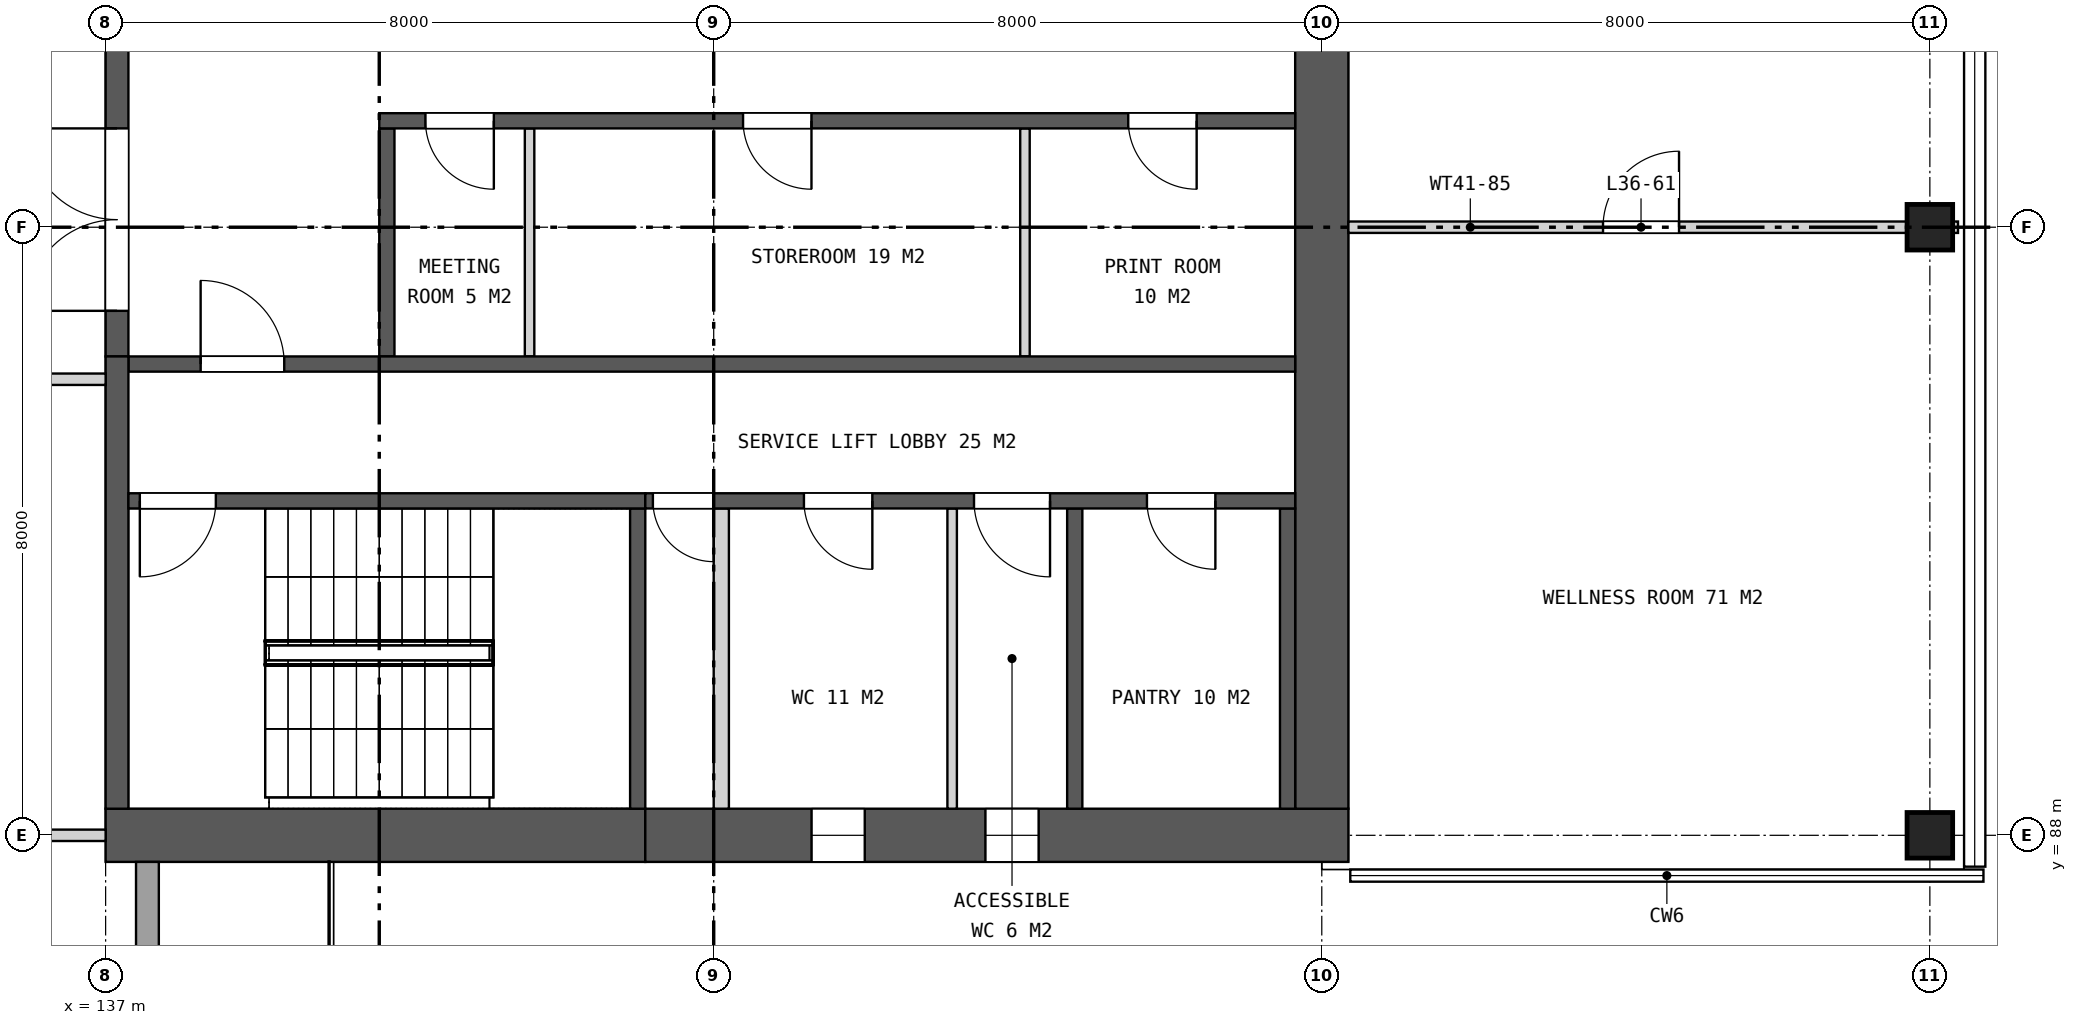
"""IFC4 building model, lengths in metres.
Left out: names, types, materials, properties, quantities, classifications, styles, units other than length and angle.
Written with IfcOpenShell. Run it as: python <this file> out.ifc"""

import sys

from ifc_helpers import new_model, si_unit, direction, frame, frame_2d, origin, origin_2d, place, context, subcontext, project, spatial, rectangle, extrude, element, fill, save


model = new_model("IFC4")
c1 = context("Model", 3, precision=1e-05, world=origin(), true_north=direction((0.0, 1.0)))
c2 = subcontext(c1, "Body", "Model", "MODEL_VIEW")
j1 = project(units=[si_unit("LENGTHUNIT", "METRE"), si_unit("PLANEANGLEUNIT", "RADIAN")], contexts=[c1])
p1 = place(None, origin())
s1 = spatial("IfcSite", under=j1, at=p1, CompositionType="ELEMENT")
p2 = place(p1, origin())
s2 = spatial("IfcBuilding", under=s1, at=p2, CompositionType="ELEMENT")
p3 = place(p2, frame((0.0, 0.0, 171.5)))
s3 = spatial("IfcBuildingStorey", under=s2, at=p3, CompositionType="ELEMENT", Elevation=171.5)
for number, where, z_axis, x_axis in (
    (1, (161.0, 88.0, 0.0), (0.0, 0.0, 1.0), (1.0, 0.0, 0.0)),
    (2, (161.0, 96.0, 0.0), (0.0, 0.0, 1.0), (1.0, 0.0, 0.0)),
):
    element("IfcColumn", number, at=place(p3, frame(where, z_axis=z_axis, x_axis=x_axis)), inside=s3, PredefinedType="COLUMN", context=c2, shape_type="SweptSolid", body=[
        extrude(rectangle(XDim=0.6, YDim=0.6, at=origin_2d()), origin(), (0.0, 0.0, 1.0), 7.4),
    ])
p4 = place(p3, frame((137.0, 88.0, 0.0), z_axis=(0.0, 0.0, 1.0), x_axis=(1.0, 0.0, 0.0)))
e3 = element("IfcWall", 3, at=p4, inside=s3, PredefinedType="SHEAR", context=c2, shape_type="SweptSolid", body=[
    extrude(rectangle(XDim=7.1, YDim=0.7, at=frame_2d((3.55, 0.0))), origin(), (0.0, 0.0, 1.0), 7.4),
])
p5 = place(p3, frame((144.1, 88.0, 0.0), z_axis=(0.0, 0.0, 1.0), x_axis=(1.0, 0.0, 0.0)))
e4 = element("IfcWall", 4, at=p5, inside=s3, PredefinedType="SHEAR", context=c2, shape_type="SweptSolid", body=[
    extrude(rectangle(XDim=9.25, YDim=0.7, at=frame_2d((4.625, 0.0))), origin(), (0.0, 0.0, 1.0), 7.4),
])
p6 = place(p5, frame((2.187, 0.0, 1.5)))
e5 = element("IfcOpeningElement", 5, at=p6, cuts=e4, PredefinedType="OPENING", context=c2, shape_type="SweptSolid", body=[
    extrude(rectangle(XDim=0.7, YDim=0.9, at=frame_2d((0.35, 0.45))), frame((0.0, 0.36, 0.0), z_axis=(0.0, -1.0, 0.0), x_axis=(1.0, 0.0, 0.0)), (0.0, 0.0, 1.0), 0.72),
])
p7 = place(p5, frame((4.475, 0.0, 1.5)))
e6 = element("IfcOpeningElement", 6, at=p7, cuts=e4, PredefinedType="OPENING", context=c2, shape_type="SweptSolid", body=[
    extrude(rectangle(XDim=0.7, YDim=0.9, at=frame_2d((0.35, 0.45))), frame((0.0, 0.36, 0.0), z_axis=(0.0, -1.0, 0.0), x_axis=(1.0, 0.0, 0.0)), (0.0, 0.0, 1.0), 0.72),
])
p8 = place(p3, frame((153.0, 88.35, 0.0), z_axis=(0.0, 0.0, 1.0), x_axis=(0.0, 1.0, 0.0)))
e7 = element("IfcWall", 7, at=p8, inside=s3, PredefinedType="SHEAR", context=c2, shape_type="SweptSolid", body=[
    extrude(rectangle(XDim=23.3, YDim=0.7, at=frame_2d((11.65, 0.0))), origin(), (0.0, 0.0, 1.0), 7.4),
])
p9 = place(p8, frame((10.45, 0.0, 0.0)))
e8 = element("IfcOpeningElement", 8, at=p9, cuts=e7, PredefinedType="OPENING", context=c2, shape_type="SweptSolid", body=[
    extrude(rectangle(XDim=2.4, YDim=2.4, at=frame_2d((1.2, 1.2))), frame((0.0, 0.36, 0.0), z_axis=(0.0, -1.0, 0.0), x_axis=(1.0, 0.0, 0.0)), (0.0, 0.0, 1.0), 0.72),
])
p10 = place(p3, frame((137.15, 94.3, 0.0), z_axis=(0.0, 0.0, 1.0), x_axis=(0.0, 1.0, 0.0)))
e9 = element("IfcWall", 9, at=p10, inside=s3, PredefinedType="SHEAR", context=c2, shape_type="SweptSolid", body=[
    extrude(rectangle(XDim=11.4, YDim=0.3, at=frame_2d((5.7, 0.0))), origin(), (0.0, 0.0, 1.0), 7.4),
])
p11 = place(p10, frame((0.6, 0.0, 0.0)))
e10 = element("IfcOpeningElement", 10, at=p11, cuts=e9, PredefinedType="OPENING", context=c2, shape_type="SweptSolid", body=[
    extrude(rectangle(XDim=2.4, YDim=2.4, at=frame_2d((1.2, 1.2))), frame((0.0, 0.16, 0.0), z_axis=(0.0, -1.0, 0.0), x_axis=(1.0, 0.0, 0.0)), (0.0, 0.0, 1.0), 0.32),
])
p12 = place(p10, frame((4.5, 0.0, 0.0)))
e11 = element("IfcOpeningElement", 11, at=p12, cuts=e9, PredefinedType="OPENING", context=c2, shape_type="SweptSolid", body=[
    extrude(rectangle(XDim=2.4, YDim=2.4, at=frame_2d((1.2, 1.2))), frame((0.0, 0.16, 0.0), z_axis=(0.0, -1.0, 0.0), x_axis=(1.0, 0.0, 0.0)), (0.0, 0.0, 1.0), 0.32),
])
p13 = place(p10, frame((8.4, 0.0, 0.0)))
e12 = element("IfcOpeningElement", 12, at=p13, cuts=e9, PredefinedType="OPENING", context=c2, shape_type="SweptSolid", body=[
    extrude(rectangle(XDim=2.4, YDim=2.4, at=frame_2d((1.2, 1.2))), frame((0.0, 0.16, 0.0), z_axis=(0.0, -1.0, 0.0), x_axis=(1.0, 0.0, 0.0)), (0.0, 0.0, 1.0), 0.32),
])
p14 = place(p3, frame((140.7, 94.3, 0.0), z_axis=(0.0, 0.0, 1.0), x_axis=(0.0, 1.0, 0.0)))
e13 = element("IfcWall", 13, at=p14, inside=s3, PredefinedType="SHEAR", context=c2, shape_type="SweptSolid", body=[
    extrude(rectangle(XDim=3.0, YDim=0.2, at=frame_2d((1.5, 0.0))), origin(), (0.0, 0.0, 1.0), 7.4),
])
for number, where, z_axis, x_axis in (
    (14, (142.577, 94.3, 0.0), (0.0, 0.0, 1.0), (0.0, 1.0, 0.0)),
    (15, (149.095, 94.3, 0.0), (0.0, 0.0, 1.0), (0.0, 1.0, 0.0)),
):
    element("IfcWall", number, at=place(p3, frame(where, z_axis=z_axis, x_axis=x_axis)), inside=s3, PredefinedType="PARTITIONING", context=c2, shape_type="SweptSolid", body=[
        extrude(rectangle(XDim=3.0, YDim=0.125, at=frame_2d((1.5, 0.0))), origin(), (0.0, 0.0, 1.0), 7.4),
    ])
p15 = place(p3, frame((140.6, 97.4, 0.0), z_axis=(0.0, 0.0, 1.0), x_axis=(1.0, 0.0, 0.0)))
e16 = element("IfcWall", 16, at=p15, inside=s3, PredefinedType="SHEAR", context=c2, shape_type="SweptSolid", body=[
    extrude(rectangle(XDim=12.05, YDim=0.2, at=frame_2d((6.025, 0.0))), origin(), (0.0, 0.0, 1.0), 7.4),
])
p16 = place(p15, frame((0.607, 0.0, 0.0)))
e17 = element("IfcOpeningElement", 17, at=p16, cuts=e16, PredefinedType="OPENING", context=c2, shape_type="SweptSolid", body=[
    extrude(rectangle(XDim=0.9, YDim=2.1, at=frame_2d((0.45, 1.05))), frame((0.0, 0.11, 0.0), z_axis=(0.0, -1.0, 0.0), x_axis=(1.0, 0.0, 0.0)), (0.0, 0.0, 1.0), 0.22),
])
p17 = place(p15, frame((4.786, 0.0, 0.0)))
e18 = element("IfcOpeningElement", 18, at=p17, cuts=e16, PredefinedType="OPENING", context=c2, shape_type="SweptSolid", body=[
    extrude(rectangle(XDim=0.9, YDim=2.1, at=frame_2d((0.45, 1.05))), frame((0.0, 0.11, 0.0), z_axis=(0.0, -1.0, 0.0), x_axis=(1.0, 0.0, 0.0)), (0.0, 0.0, 1.0), 0.22),
])
p18 = place(p15, frame((9.854, 0.0, 0.0)))
e19 = element("IfcOpeningElement", 19, at=p18, cuts=e16, PredefinedType="OPENING", context=c2, shape_type="SweptSolid", body=[
    extrude(rectangle(XDim=0.9, YDim=2.1, at=frame_2d((0.45, 1.05))), frame((0.0, 0.11, 0.0), z_axis=(0.0, -1.0, 0.0), x_axis=(1.0, 0.0, 0.0)), (0.0, 0.0, 1.0), 0.22),
])
p19 = place(p3, frame((137.3, 94.2, 0.0), z_axis=(0.0, 0.0, 1.0), x_axis=(1.0, 0.0, 0.0)))
e20 = element("IfcWall", 20, at=p19, inside=s3, PredefinedType="SHEAR", context=c2, shape_type="SweptSolid", body=[
    extrude(rectangle(XDim=15.35, YDim=0.2, at=frame_2d((7.675, 0.0))), origin(), (0.0, 0.0, 1.0), 7.4),
])
p20 = place(p19, frame((0.95, 0.0, 0.0)))
e21 = element("IfcOpeningElement", 21, at=p20, cuts=e20, PredefinedType="OPENING", context=c2, shape_type="SweptSolid", body=[
    extrude(rectangle(XDim=1.1, YDim=2.1, at=frame_2d((0.55, 1.05))), frame((0.0, 0.11, 0.0), z_axis=(0.0, -1.0, 0.0), x_axis=(1.0, 0.0, 0.0)), (0.0, 0.0, 1.0), 0.22),
])
p21 = place(p3, frame((137.15, 88.35, 0.0), z_axis=(0.0, 0.0, 1.0), x_axis=(0.0, 1.0, 0.0)))
e22 = element("IfcWall", 22, at=p21, inside=s3, PredefinedType="SHEAR", context=c2, shape_type="SweptSolid", body=[
    extrude(rectangle(XDim=5.95, YDim=0.3, at=frame_2d((2.975, 0.0))), origin(), (0.0, 0.0, 1.0), 7.4),
])
for number, where, z_axis, x_axis in (
    (23, (144.0, 88.35, 0.0), (0.0, 0.0, 1.0), (0.0, 1.0, 0.0)),
    (24, (149.75, 88.35, 0.0), (0.0, 0.0, 1.0), (0.0, 1.0, 0.0)),
    (25, (152.55, 88.35, 0.0), (0.0, 0.0, 1.0), (0.0, 1.0, 0.0)),
):
    element("IfcWall", number, at=place(p3, frame(where, z_axis=z_axis, x_axis=x_axis)), inside=s3, PredefinedType="SHEAR", context=c2, shape_type="SweptSolid", body=[
        extrude(rectangle(XDim=3.95, YDim=0.2, at=frame_2d((1.975, 0.0))), origin(), (0.0, 0.0, 1.0), 7.4),
    ])
p22 = place(p3, frame((145.1, 88.35, 0.0), z_axis=(0.0, 0.0, 1.0), x_axis=(0.0, 1.0, 0.0)))
e26 = element("IfcWall", 26, at=p22, inside=s3, PredefinedType="PARTITIONING", context=c2, shape_type="SweptSolid", body=[
    extrude(rectangle(XDim=3.95, YDim=0.2, at=frame_2d((1.975, 0.0))), origin(), (0.0, 0.0, 1.0), 7.4),
])
p23 = place(p3, frame((148.137, 88.35, 0.0), z_axis=(0.0, 0.0, 1.0), x_axis=(0.0, 1.0, 0.0)))
e27 = element("IfcWall", 27, at=p23, inside=s3, PredefinedType="PARTITIONING", context=c2, shape_type="SweptSolid", body=[
    extrude(rectangle(XDim=3.95, YDim=0.125, at=frame_2d((1.975, 0.0))), origin(), (0.0, 0.0, 1.0), 7.4),
])
p24 = place(p3, frame((137.3, 92.4, 0.0), z_axis=(0.0, 0.0, 1.0), x_axis=(1.0, 0.0, 0.0)))
e28 = element("IfcWall", 28, at=p24, inside=s3, PredefinedType="SHEAR", context=c2, shape_type="SweptSolid", body=[
    extrude(rectangle(XDim=6.8, YDim=0.2, at=frame_2d((3.4, 0.0))), origin(), (0.0, 0.0, 1.0), 7.4),
])
p25 = place(p24, frame((0.15, 0.0, 0.0)))
e29 = element("IfcOpeningElement", 29, at=p25, cuts=e28, PredefinedType="OPENING", context=c2, shape_type="SweptSolid", body=[
    extrude(rectangle(XDim=1.0, YDim=2.1, at=frame_2d((0.5, 1.05))), frame((0.0, 0.11, 0.0), z_axis=(0.0, -1.0, 0.0), x_axis=(1.0, 0.0, 0.0)), (0.0, 0.0, 1.0), 0.22),
])
p26 = place(p3, frame((144.1, 92.4, 0.0), z_axis=(0.0, 0.0, 1.0), x_axis=(1.0, 0.0, 0.0)))
e30 = element("IfcWall", 30, at=p26, inside=s3, PredefinedType="SHEAR", context=c2, shape_type="SweptSolid", body=[
    extrude(rectangle(XDim=8.55, YDim=0.2, at=frame_2d((4.275, 0.0))), origin(), (0.0, 0.0, 1.0), 7.4),
])
p27 = place(p26, frame((0.1, 0.0, 0.0)))
e31 = element("IfcOpeningElement", 31, at=p27, cuts=e30, PredefinedType="OPENING", context=c2, shape_type="SweptSolid", body=[
    extrude(rectangle(XDim=0.8, YDim=2.1, at=frame_2d((0.4, 1.05))), frame((0.0, 0.11, 0.0), z_axis=(0.0, -1.0, 0.0), x_axis=(1.0, 0.0, 0.0)), (0.0, 0.0, 1.0), 0.22),
])
p28 = place(p26, frame((2.087, 0.0, 0.0)))
e32 = element("IfcOpeningElement", 32, at=p28, cuts=e30, PredefinedType="OPENING", context=c2, shape_type="SweptSolid", body=[
    extrude(rectangle(XDim=0.9, YDim=2.1, at=frame_2d((0.45, 1.05))), frame((0.0, 0.11, 0.0), z_axis=(0.0, -1.0, 0.0), x_axis=(1.0, 0.0, 0.0)), (0.0, 0.0, 1.0), 0.22),
])
p29 = place(p26, frame((4.325, 0.0, 0.0)))
e33 = element("IfcOpeningElement", 33, at=p29, cuts=e30, PredefinedType="OPENING", context=c2, shape_type="SweptSolid", body=[
    extrude(rectangle(XDim=1.0, YDim=2.1, at=frame_2d((0.5, 1.05))), frame((0.0, 0.11, 0.0), z_axis=(0.0, -1.0, 0.0), x_axis=(1.0, 0.0, 0.0)), (0.0, 0.0, 1.0), 0.22),
])
p30 = place(p26, frame((6.6, 0.0, 0.0)))
e34 = element("IfcOpeningElement", 34, at=p30, cuts=e30, PredefinedType="OPENING", context=c2, shape_type="SweptSolid", body=[
    extrude(rectangle(XDim=0.9, YDim=2.1, at=frame_2d((0.45, 1.05))), frame((0.0, 0.11, 0.0), z_axis=(0.0, -1.0, 0.0), x_axis=(1.0, 0.0, 0.0)), (0.0, 0.0, 1.0), 0.22),
])
p31 = place(p3, frame((137.55, 80.038, 0.0), z_axis=(0.0, 0.0, 1.0), x_axis=(0.0, 1.0, 0.0)))
e35 = element("IfcWall", 35, at=p31, inside=s3, PredefinedType="SOLIDWALL", context=c2, shape_type="SweptSolid", body=[
    extrude(rectangle(XDim=7.612, YDim=0.3, at=frame_2d((3.806, 0.0))), origin(), (0.0, 0.0, 1.0), 7.1),
])
p32 = place(p31, frame((2.762, 0.0, 0.0)))
e36 = element("IfcOpeningElement", 36, at=p32, cuts=e35, PredefinedType="OPENING", context=c2, shape_type="SweptSolid", body=[
    extrude(rectangle(XDim=2.4, YDim=2.4, at=frame_2d((1.2, 1.2))), frame((0.0, 0.16, 0.0), z_axis=(0.0, -1.0, 0.0), x_axis=(1.0, 0.0, 0.0)), (0.0, 0.0, 1.0), 0.32),
])
p33 = place(p3, frame((129.075, 88.0, 0.0), z_axis=(0.0, 0.0, 1.0), x_axis=(1.0, 0.0, 0.0)))
e37 = element("IfcWall", 37, at=p33, inside=s3, PredefinedType="PARTITIONING", context=c2, shape_type="SweptSolid", body=[
    extrude(rectangle(XDim=7.925, YDim=0.15, at=frame_2d((3.962, 0.0))), origin(), (0.0, 0.0, 1.0), 6.64),
])
p34 = place(p3, frame((131.475, 94.0, 0.0), z_axis=(0.0, 0.0, 1.0), x_axis=(1.0, 0.0, 0.0)))
e38 = element("IfcWall", 38, at=p34, inside=s3, PredefinedType="PARTITIONING", context=c2, shape_type="SweptSolid", body=[
    extrude(rectangle(XDim=5.525, YDim=0.15, at=frame_2d((2.762, 0.0))), origin(), (0.0, 0.0, 1.0), 6.64),
])
p35 = place(p3, frame((153.35, 96.0, 0.0), z_axis=(0.0, 0.0, 1.0), x_axis=(1.0, 0.0, 0.0)))
e39 = element("IfcWall", 39, at=p35, inside=s3, PredefinedType="PARTITIONING", context=c2, shape_type="SweptSolid", body=[
    extrude(rectangle(XDim=8.02, YDim=0.15, at=frame_2d((4.01, 0.0))), origin(), (0.0, 0.0, 1.0), 6.64),
])
p36 = place(p35, frame((3.35, 0.0, 0.0)))
e40 = element("IfcOpeningElement", 40, at=p36, cuts=e39, PredefinedType="OPENING", context=c2, shape_type="SweptSolid", body=[
    extrude(rectangle(XDim=1.0, YDim=2.1, at=frame_2d((0.5, 1.05))), frame((0.0, 0.085, 0.0), z_axis=(0.0, -1.0, 0.0), x_axis=(1.0, 0.0, 0.0)), (0.0, 0.0, 1.0), 0.17),
])
p37 = place(p6, origin())
e41 = element("IfcWindow", 41, at=p37, inside=s3, PartitioningType="SINGLE_PANEL", PredefinedType="WINDOW", context=c2, shape_type="SweptSolid", body=[
    extrude(rectangle(XDim=0.7, YDim=0.9, at=frame_2d((0.35, 0.45))), frame((0.0, 0.03, 0.0), z_axis=(0.0, -1.0, 0.0), x_axis=(1.0, 0.0, 0.0)), (0.0, 0.0, 1.0), 0.06),
])
fill(e5, e41)
p38 = place(p7, origin())
e42 = element("IfcWindow", 42, at=p38, inside=s3, PartitioningType="SINGLE_PANEL", PredefinedType="WINDOW", context=c2, shape_type="SweptSolid", body=[
    extrude(rectangle(XDim=0.7, YDim=0.9, at=frame_2d((0.35, 0.45))), frame((0.0, 0.03, 0.0), z_axis=(0.0, -1.0, 0.0), x_axis=(1.0, 0.0, 0.0)), (0.0, 0.0, 1.0), 0.06),
])
fill(e6, e42)
p39 = place(p11, origin())
e43 = element("IfcDoor", 43, at=p39, inside=s3, OperationType="DOUBLE_DOOR_SINGLE_SWING", PredefinedType="DOOR", context=c2, shape_type="SweptSolid", body=[
    extrude(rectangle(XDim=2.4, YDim=2.4, at=frame_2d((1.2, 1.2))), frame((0.0, 0.025, 0.0), z_axis=(0.0, -1.0, 0.0), x_axis=(1.0, 0.0, 0.0)), (0.0, 0.0, 1.0), 0.05),
])
fill(e10, e43)
p40 = place(p16, frame((0.9, 0.0, 0.0), z_axis=(0.0, 0.0, 1.0), x_axis=(-1.0, 0.0, 0.0)))
e44 = element("IfcDoor", 44, at=p40, inside=s3, OperationType="SINGLE_SWING_LEFT", PredefinedType="DOOR", context=c2, shape_type="SweptSolid", body=[
    extrude(rectangle(XDim=0.9, YDim=2.1, at=frame_2d((0.45, 1.05))), frame((0.0, 0.025, 0.0), z_axis=(0.0, -1.0, 0.0), x_axis=(1.0, 0.0, 0.0)), (0.0, 0.0, 1.0), 0.05),
])
fill(e17, e44)
p41 = place(p17, frame((0.9, 0.0, 0.0), z_axis=(0.0, 0.0, 1.0), x_axis=(-1.0, 0.0, 0.0)))
e45 = element("IfcDoor", 45, at=p41, inside=s3, OperationType="SINGLE_SWING_LEFT", PredefinedType="DOOR", context=c2, shape_type="SweptSolid", body=[
    extrude(rectangle(XDim=0.9, YDim=2.1, at=frame_2d((0.45, 1.05))), frame((0.0, 0.025, 0.0), z_axis=(0.0, -1.0, 0.0), x_axis=(1.0, 0.0, 0.0)), (0.0, 0.0, 1.0), 0.05),
])
fill(e18, e45)
p42 = place(p18, frame((0.9, 0.0, 0.0), z_axis=(0.0, 0.0, 1.0), x_axis=(-1.0, 0.0, 0.0)))
e46 = element("IfcDoor", 46, at=p42, inside=s3, OperationType="SINGLE_SWING_LEFT", PredefinedType="DOOR", context=c2, shape_type="SweptSolid", body=[
    extrude(rectangle(XDim=0.9, YDim=2.1, at=frame_2d((0.45, 1.05))), frame((0.0, 0.025, 0.0), z_axis=(0.0, -1.0, 0.0), x_axis=(1.0, 0.0, 0.0)), (0.0, 0.0, 1.0), 0.05),
])
fill(e19, e46)
p43 = place(p20, origin())
e47 = element("IfcDoor", 47, at=p43, inside=s3, OperationType="SINGLE_SWING_LEFT", PredefinedType="DOOR", context=c2, shape_type="SweptSolid", body=[
    extrude(rectangle(XDim=1.1, YDim=2.1, at=frame_2d((0.55, 1.05))), frame((0.0, 0.025, 0.0), z_axis=(0.0, -1.0, 0.0), x_axis=(1.0, 0.0, 0.0)), (0.0, 0.0, 1.0), 0.05),
])
fill(e21, e47)
p44 = place(p25, frame((1.0, 0.0, 0.0), z_axis=(0.0, 0.0, 1.0), x_axis=(-1.0, 0.0, 0.0)))
e48 = element("IfcDoor", 48, at=p44, inside=s3, OperationType="SINGLE_SWING_RIGHT", PredefinedType="DOOR", context=c2, shape_type="SweptSolid", body=[
    extrude(rectangle(XDim=1.0, YDim=2.1, at=frame_2d((0.5, 1.05))), frame((0.0, 0.025, 0.0), z_axis=(0.0, -1.0, 0.0), x_axis=(1.0, 0.0, 0.0)), (0.0, 0.0, 1.0), 0.05),
])
fill(e29, e48)
p45 = place(p27, frame((0.8, 0.0, 0.0), z_axis=(0.0, 0.0, 1.0), x_axis=(-1.0, 0.0, 0.0)))
e49 = element("IfcDoor", 49, at=p45, inside=s3, OperationType="SINGLE_SWING_LEFT", PredefinedType="DOOR", context=c2, shape_type="SweptSolid", body=[
    extrude(rectangle(XDim=0.8, YDim=2.1, at=frame_2d((0.4, 1.05))), frame((0.0, 0.025, 0.0), z_axis=(0.0, -1.0, 0.0), x_axis=(1.0, 0.0, 0.0)), (0.0, 0.0, 1.0), 0.05),
])
fill(e31, e49)
p46 = place(p28, frame((0.9, 0.0, 0.0), z_axis=(0.0, 0.0, 1.0), x_axis=(-1.0, 0.0, 0.0)))
e50 = element("IfcDoor", 50, at=p46, inside=s3, OperationType="SINGLE_SWING_LEFT", PredefinedType="DOOR", context=c2, shape_type="SweptSolid", body=[
    extrude(rectangle(XDim=0.9, YDim=2.1, at=frame_2d((0.45, 1.05))), frame((0.0, 0.025, 0.0), z_axis=(0.0, -1.0, 0.0), x_axis=(1.0, 0.0, 0.0)), (0.0, 0.0, 1.0), 0.05),
])
fill(e32, e50)
p47 = place(p29, frame((1.0, 0.0, 0.0), z_axis=(0.0, 0.0, 1.0), x_axis=(-1.0, 0.0, 0.0)))
e51 = element("IfcDoor", 51, at=p47, inside=s3, OperationType="SINGLE_SWING_LEFT", PredefinedType="DOOR", context=c2, shape_type="SweptSolid", body=[
    extrude(rectangle(XDim=1.0, YDim=2.1, at=frame_2d((0.5, 1.05))), frame((0.0, 0.025, 0.0), z_axis=(0.0, -1.0, 0.0), x_axis=(1.0, 0.0, 0.0)), (0.0, 0.0, 1.0), 0.05),
])
fill(e33, e51)
p48 = place(p30, frame((0.9, 0.0, 0.0), z_axis=(0.0, 0.0, 1.0), x_axis=(-1.0, 0.0, 0.0)))
e52 = element("IfcDoor", 52, at=p48, inside=s3, OperationType="SINGLE_SWING_LEFT", PredefinedType="DOOR", context=c2, shape_type="SweptSolid", body=[
    extrude(rectangle(XDim=0.9, YDim=2.1, at=frame_2d((0.45, 1.05))), frame((0.0, 0.025, 0.0), z_axis=(0.0, -1.0, 0.0), x_axis=(1.0, 0.0, 0.0)), (0.0, 0.0, 1.0), 0.05),
])
fill(e34, e52)
p49 = place(p36, origin())
e53 = element("IfcDoor", 53, at=p49, inside=s3, OperationType="SINGLE_SWING_RIGHT", PredefinedType="DOOR", context=c2, shape_type="SweptSolid", body=[
    extrude(rectangle(XDim=1.0, YDim=2.1, at=frame_2d((0.5, 1.05))), frame((0.0, 0.025, 0.0), z_axis=(0.0, -1.0, 0.0), x_axis=(1.0, 0.0, 0.0)), (0.0, 0.0, 1.0), 0.05),
])
fill(e40, e53)
save(model, sys.argv[1])
